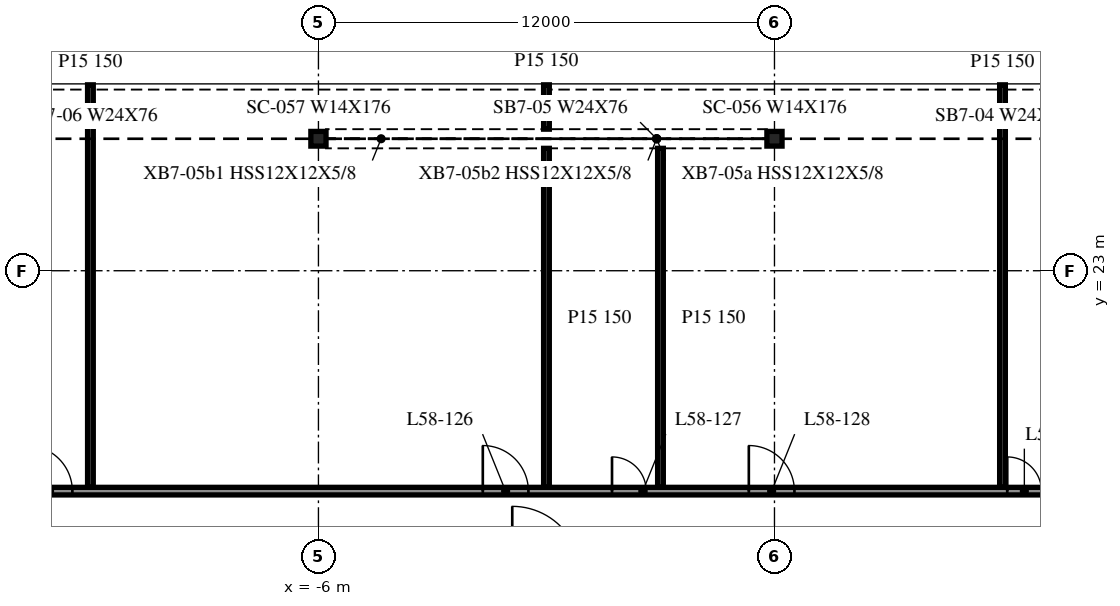
"""IFC4 building model, lengths in metres.
Left out: names, types, materials, properties, quantities, classifications, styles, units other than length and angle.
Written with IfcOpenShell. Run it as: python <this file> out.ifc"""

import sys

from ifc_helpers import new_model, si_unit, direction, frame, frame_2d, origin, origin_2d, place, context, subcontext, project, spatial, rectangle, i_section, extrude, element, fill, save


model = new_model("IFC4")
c1 = context("Model", 3, precision=1e-05, world=origin(), true_north=direction((0.0, 1.0)))
c2 = subcontext(c1, "Body", "Model", "MODEL_VIEW")
j1 = project(units=[si_unit("LENGTHUNIT", "METRE"), si_unit("PLANEANGLEUNIT", "RADIAN")], contexts=[c1])
p1 = place(None, origin())
s1 = spatial("IfcSite", under=j1, at=p1, CompositionType="ELEMENT")
p2 = place(p1, origin())
s2 = spatial("IfcBuilding", under=s1, at=p2, CompositionType="ELEMENT")
p3 = place(p2, frame((0.0, 0.0, 240.0)))
s3 = spatial("IfcBuildingStorey", under=s2, at=p3, CompositionType="ELEMENT", Elevation=240.0)
for number, where, z_axis, x_axis in (
    (1, (6.0, 26.473, -0.34), (0.0, 0.0, 1.0), (1.0, 0.0, 0.0)),
    (2, (-6.0, 26.473, -0.34), (0.0, 0.0, 1.0), (1.0, 0.0, 0.0)),
):
    element("IfcColumn", number, at=place(p3, frame(where, z_axis=z_axis, x_axis=x_axis)), inside=s3, PredefinedType="COLUMN", context=c2, shape_type="SweptSolid", body=[
        extrude(i_section(OverallWidth=0.399, OverallDepth=0.386, WebThickness=0.021, FlangeThickness=0.033, at=origin_2d()), origin(), (0.0, 0.0, 1.0), 3.8),
    ])
p4 = place(p3, frame((-41.975, 17.2, 0.0), z_axis=(0.0, 0.0, 1.0), x_axis=(1.0, 0.0, 0.0)))
e3 = element("IfcWall", 3, at=p4, inside=s3, PredefinedType="PARTITIONING", context=c2, shape_type="SweptSolid", body=[
    extrude(rectangle(XDim=95.95, YDim=0.2, at=frame_2d((47.975, 0.0))), origin(), (0.0, 0.0, 1.0), 3.46),
])
p5 = place(p4, frame((10.7, 0.0, 0.0)))
e4 = element("IfcOpeningElement", 4, at=p5, cuts=e3, PredefinedType="OPENING", context=c2, shape_type="SweptSolid", body=[
    extrude(rectangle(XDim=0.9, YDim=2.1, at=frame_2d((0.45, 1.05))), frame((0.0, 0.11, 0.0), z_axis=(0.0, -1.0, 0.0), x_axis=(1.0, 0.0, 0.0)), (0.0, 0.0, 1.0), 0.22),
])
p6 = place(p4, frame((13.3, 0.0, 0.0)))
e5 = element("IfcOpeningElement", 5, at=p6, cuts=e3, PredefinedType="OPENING", context=c2, shape_type="SweptSolid", body=[
    extrude(rectangle(XDim=1.2, YDim=2.1, at=frame_2d((0.6, 1.05))), frame((0.0, 0.11, 0.0), z_axis=(0.0, -1.0, 0.0), x_axis=(1.0, 0.0, 0.0)), (0.0, 0.0, 1.0), 0.22),
])
p7 = place(p4, frame((22.7, 0.0, 0.0)))
e6 = element("IfcOpeningElement", 6, at=p7, cuts=e3, PredefinedType="OPENING", context=c2, shape_type="SweptSolid", body=[
    extrude(rectangle(XDim=0.9, YDim=2.1, at=frame_2d((0.45, 1.05))), frame((0.0, 0.11, 0.0), z_axis=(0.0, -1.0, 0.0), x_axis=(1.0, 0.0, 0.0)), (0.0, 0.0, 1.0), 0.22),
])
p8 = place(p4, frame((28.3, 0.0, 0.0)))
e7 = element("IfcOpeningElement", 7, at=p8, cuts=e3, PredefinedType="OPENING", context=c2, shape_type="SweptSolid", body=[
    extrude(rectangle(XDim=1.2, YDim=2.1, at=frame_2d((0.6, 1.05))), frame((0.0, 0.11, 0.0), z_axis=(0.0, -1.0, 0.0), x_axis=(1.0, 0.0, 0.0)), (0.0, 0.0, 1.0), 0.22),
])
p9 = place(p4, frame((40.3, 0.0, 0.0)))
e8 = element("IfcOpeningElement", 8, at=p9, cuts=e3, PredefinedType="OPENING", context=c2, shape_type="SweptSolid", body=[
    extrude(rectangle(XDim=1.2, YDim=2.1, at=frame_2d((0.6, 1.05))), frame((0.0, 0.11, 0.0), z_axis=(0.0, -1.0, 0.0), x_axis=(1.0, 0.0, 0.0)), (0.0, 0.0, 1.0), 0.22),
])
p10 = place(p4, frame((43.7, 0.0, 0.0)))
e9 = element("IfcOpeningElement", 9, at=p10, cuts=e3, PredefinedType="OPENING", context=c2, shape_type="SweptSolid", body=[
    extrude(rectangle(XDim=0.9, YDim=2.1, at=frame_2d((0.45, 1.05))), frame((0.0, 0.11, 0.0), z_axis=(0.0, -1.0, 0.0), x_axis=(1.0, 0.0, 0.0)), (0.0, 0.0, 1.0), 0.22),
])
p11 = place(p4, frame((47.3, 0.0, 0.0)))
e10 = element("IfcOpeningElement", 10, at=p11, cuts=e3, PredefinedType="OPENING", context=c2, shape_type="SweptSolid", body=[
    extrude(rectangle(XDim=1.2, YDim=2.1, at=frame_2d((0.6, 1.05))), frame((0.0, 0.11, 0.0), z_axis=(0.0, -1.0, 0.0), x_axis=(1.0, 0.0, 0.0)), (0.0, 0.0, 1.0), 0.22),
])
p12 = place(p4, frame((54.1, 0.0, 0.0)))
e11 = element("IfcOpeningElement", 11, at=p12, cuts=e3, PredefinedType="OPENING", context=c2, shape_type="SweptSolid", body=[
    extrude(rectangle(XDim=0.9, YDim=2.1, at=frame_2d((0.45, 1.05))), frame((0.0, 0.11, 0.0), z_axis=(0.0, -1.0, 0.0), x_axis=(1.0, 0.0, 0.0)), (0.0, 0.0, 1.0), 0.22),
])
p13 = place(p4, frame((60.1, 0.0, 0.0)))
e12 = element("IfcOpeningElement", 12, at=p13, cuts=e3, PredefinedType="OPENING", context=c2, shape_type="SweptSolid", body=[
    extrude(rectangle(XDim=1.2, YDim=2.1, at=frame_2d((0.6, 1.05))), frame((0.0, 0.11, 0.0), z_axis=(0.0, -1.0, 0.0), x_axis=(1.0, 0.0, 0.0)), (0.0, 0.0, 1.0), 0.22),
])
p14 = place(p4, frame((72.1, 0.0, 0.0)))
e13 = element("IfcOpeningElement", 13, at=p14, cuts=e3, PredefinedType="OPENING", context=c2, shape_type="SweptSolid", body=[
    extrude(rectangle(XDim=1.2, YDim=2.1, at=frame_2d((0.6, 1.05))), frame((0.0, 0.11, 0.0), z_axis=(0.0, -1.0, 0.0), x_axis=(1.0, 0.0, 0.0)), (0.0, 0.0, 1.0), 0.22),
])
p15 = place(p4, frame((75.1, 0.0, 0.0)))
e14 = element("IfcOpeningElement", 14, at=p15, cuts=e3, PredefinedType="OPENING", context=c2, shape_type="SweptSolid", body=[
    extrude(rectangle(XDim=0.9, YDim=2.1, at=frame_2d((0.45, 1.05))), frame((0.0, 0.11, 0.0), z_axis=(0.0, -1.0, 0.0), x_axis=(1.0, 0.0, 0.0)), (0.0, 0.0, 1.0), 0.22),
])
p16 = place(p4, frame((84.1, 0.0, 0.0)))
e15 = element("IfcOpeningElement", 15, at=p16, cuts=e3, PredefinedType="OPENING", context=c2, shape_type="SweptSolid", body=[
    extrude(rectangle(XDim=1.2, YDim=2.1, at=frame_2d((0.6, 1.05))), frame((0.0, 0.11, 0.0), z_axis=(0.0, -1.0, 0.0), x_axis=(1.0, 0.0, 0.0)), (0.0, 0.0, 1.0), 0.22),
])
p17 = place(p4, frame((90.1, 0.0, 0.0)))
e16 = element("IfcOpeningElement", 16, at=p17, cuts=e3, PredefinedType="OPENING", context=c2, shape_type="SweptSolid", body=[
    extrude(rectangle(XDim=0.9, YDim=2.1, at=frame_2d((0.45, 1.05))), frame((0.0, 0.11, 0.0), z_axis=(0.0, -1.0, 0.0), x_axis=(1.0, 0.0, 0.0)), (0.0, 0.0, 1.0), 0.22),
])
p18 = place(p3, frame((-12.0, 17.3, 0.0), z_axis=(0.0, 0.0, 1.0), x_axis=(0.0, 1.0, 0.0)))
e17 = element("IfcWall", 17, at=p18, inside=s3, PredefinedType="PARTITIONING", context=c2, shape_type="SweptSolid", body=[
    extrude(rectangle(XDim=10.592, YDim=0.15, at=frame_2d((5.296, 0.0))), origin(), (0.0, 0.0, 1.0), 3.46),
])
p19 = place(p3, frame((0.0, 17.3, 0.0), z_axis=(0.0, 0.0, 1.0), x_axis=(0.0, 1.0, 0.0)))
e18 = element("IfcWall", 18, at=p19, inside=s3, PredefinedType="PARTITIONING", context=c2, shape_type="SweptSolid", body=[
    extrude(rectangle(XDim=8.921, YDim=0.15, at=frame_2d((4.46, 0.0))), origin(), (0.0, 0.0, 1.0), 3.46),
])
p20 = place(p3, frame((0.0, 26.725, 0.0), z_axis=(0.0, 0.0, 1.0), x_axis=(0.0, 1.0, 0.0)))
e19 = element("IfcWall", 19, at=p20, inside=s3, PredefinedType="PARTITIONING", context=c2, shape_type="SweptSolid", body=[
    extrude(rectangle(XDim=1.167, YDim=0.15, at=frame_2d((0.583, 0.0))), origin(), (0.0, 0.0, 1.0), 3.46),
])
p21 = place(p3, frame((3.0, 17.3, 0.0), z_axis=(0.0, 0.0, 1.0), x_axis=(0.0, 1.0, 0.0)))
e20 = element("IfcWall", 20, at=p21, inside=s3, PredefinedType="PARTITIONING", context=c2, shape_type="SweptSolid", body=[
    extrude(rectangle(XDim=8.921, YDim=0.15, at=frame_2d((4.46, 0.0))), origin(), (0.0, 0.0, 1.0), 3.46),
])
p22 = place(p3, frame((12.0, 17.3, 0.0), z_axis=(0.0, 0.0, 1.0), x_axis=(0.0, 1.0, 0.0)))
e21 = element("IfcWall", 21, at=p22, inside=s3, PredefinedType="PARTITIONING", context=c2, shape_type="SweptSolid", body=[
    extrude(rectangle(XDim=10.592, YDim=0.15, at=frame_2d((5.296, 0.0))), origin(), (0.0, 0.0, 1.0), 3.46),
])
p23 = place(p8, origin())
e22 = element("IfcDoor", 22, at=p23, inside=s3, OperationType="SINGLE_SWING_LEFT", PredefinedType="DOOR", context=c2, shape_type="SweptSolid", body=[
    extrude(rectangle(XDim=1.2, YDim=2.1, at=frame_2d((0.6, 1.05))), frame((0.0, 0.025, 0.0), z_axis=(0.0, -1.0, 0.0), x_axis=(1.0, 0.0, 0.0)), (0.0, 0.0, 1.0), 0.05),
])
fill(e7, e22)
p24 = place(p9, origin())
e23 = element("IfcDoor", 23, at=p24, inside=s3, OperationType="SINGLE_SWING_LEFT", PredefinedType="DOOR", context=c2, shape_type="SweptSolid", body=[
    extrude(rectangle(XDim=1.2, YDim=2.1, at=frame_2d((0.6, 1.05))), frame((0.0, 0.025, 0.0), z_axis=(0.0, -1.0, 0.0), x_axis=(1.0, 0.0, 0.0)), (0.0, 0.0, 1.0), 0.05),
])
fill(e8, e23)
p25 = place(p10, origin())
e24 = element("IfcDoor", 24, at=p25, inside=s3, OperationType="SINGLE_SWING_LEFT", PredefinedType="DOOR", context=c2, shape_type="SweptSolid", body=[
    extrude(rectangle(XDim=0.9, YDim=2.1, at=frame_2d((0.45, 1.05))), frame((0.0, 0.025, 0.0), z_axis=(0.0, -1.0, 0.0), x_axis=(1.0, 0.0, 0.0)), (0.0, 0.0, 1.0), 0.05),
])
fill(e9, e24)
p26 = place(p11, origin())
e25 = element("IfcDoor", 25, at=p26, inside=s3, OperationType="SINGLE_SWING_RIGHT", PredefinedType="DOOR", context=c2, shape_type="SweptSolid", body=[
    extrude(rectangle(XDim=1.2, YDim=2.1, at=frame_2d((0.6, 1.05))), frame((0.0, 0.025, 0.0), z_axis=(0.0, -1.0, 0.0), x_axis=(1.0, 0.0, 0.0)), (0.0, 0.0, 1.0), 0.05),
])
fill(e10, e25)
p27 = place(p12, origin())
e26 = element("IfcDoor", 26, at=p27, inside=s3, OperationType="SINGLE_SWING_RIGHT", PredefinedType="DOOR", context=c2, shape_type="SweptSolid", body=[
    extrude(rectangle(XDim=0.9, YDim=2.1, at=frame_2d((0.45, 1.05))), frame((0.0, 0.025, 0.0), z_axis=(0.0, -1.0, 0.0), x_axis=(1.0, 0.0, 0.0)), (0.0, 0.0, 1.0), 0.05),
])
fill(e11, e26)
save(model, sys.argv[1])
